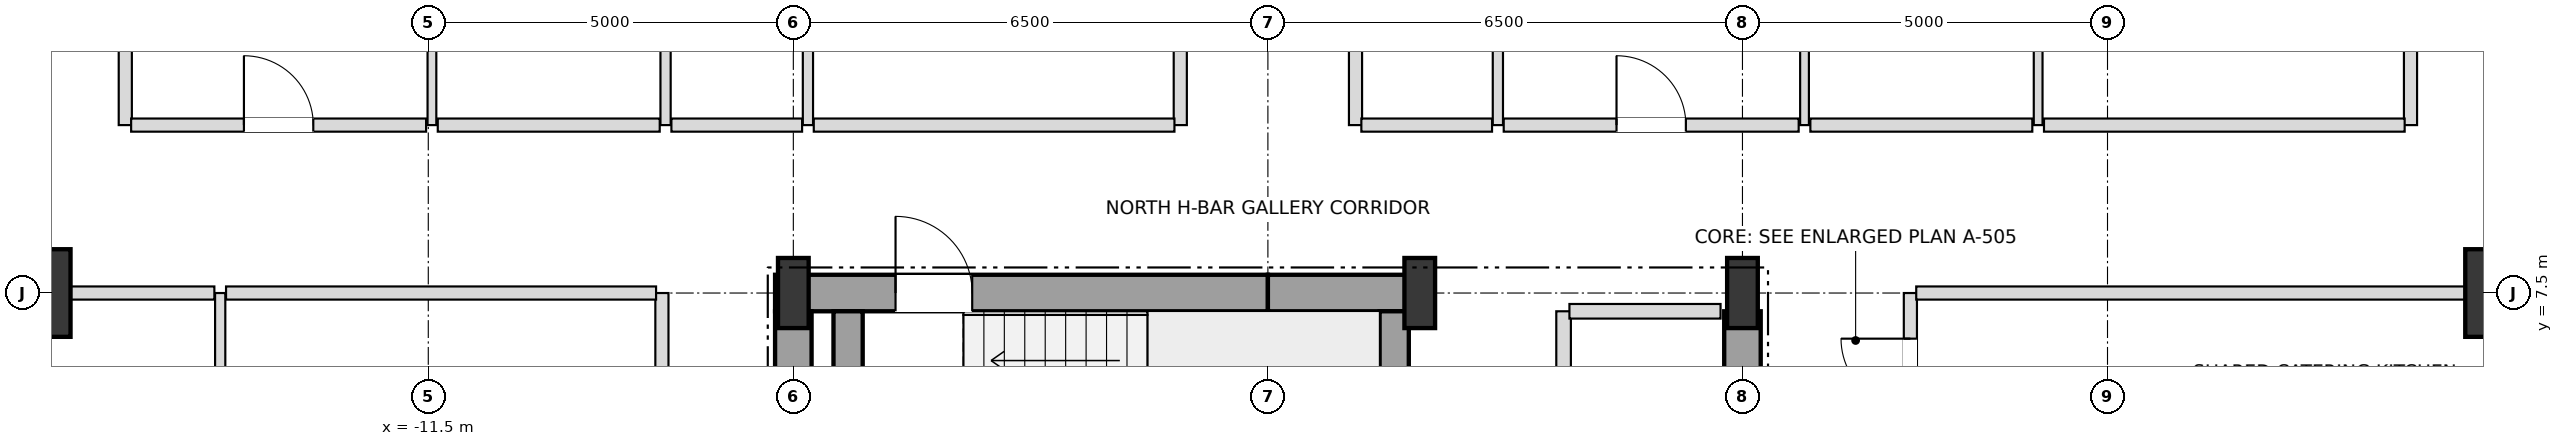
"""IFC4 building model, lengths in metres.
Left out: names, types, materials, properties, quantities, classifications, styles, units other than length and angle.
Written with IfcOpenShell. Run it as: python <this file> out.ifc"""

import sys

from ifc_helpers import new_model, si_unit, direction, frame, frame_2d, origin, origin_2d, place, context, subcontext, project, spatial, rectangle, i_section, extrude, element, fill, save


model = new_model("IFC4")
c1 = context("Model", 3, precision=1e-05, world=origin(), true_north=direction((0.0, 1.0)))
c2 = subcontext(c1, "Body", "Model", "MODEL_VIEW")
j1 = project(units=[si_unit("LENGTHUNIT", "METRE"), si_unit("PLANEANGLEUNIT", "RADIAN")], contexts=[c1])
p1 = place(None, origin())
s1 = spatial("IfcSite", under=j1, at=p1, CompositionType="ELEMENT")
p2 = place(p1, origin())
s2 = spatial("IfcBuilding", under=s1, at=p2, CompositionType="ELEMENT")
p3 = place(p2, frame((0.0, 0.0, 140.4)))
s3 = spatial("IfcBuildingStorey", under=s2, at=p3, CompositionType="ELEMENT", Elevation=140.4)
for number, where, z_axis, x_axis in (
    (1, (-6.5, 7.5, 0.0), (0.0, 0.0, 1.0), (1.0, 0.0, 0.0)),
    (2, (2.08, 7.5, 0.0), (0.0, 0.0, 1.0), (1.0, 0.0, 0.0)),
    (3, (6.5, 7.5, 0.0), (0.0, 0.0, 1.0), (1.0, 0.0, 0.0)),
):
    element("IfcColumn", number, at=place(p3, frame(where, z_axis=z_axis, x_axis=x_axis)), inside=s3, PredefinedType="COLUMN", context=c2, shape_type="SweptSolid", body=[
        extrude(i_section(OverallWidth=0.42, OverallDepth=0.96, WebThickness=0.022, FlangeThickness=0.034, at=origin_2d()), origin(), (0.0, 0.0, 1.0), 3.6),
    ])
for number, where, z_axis, x_axis in (
    (4, (17.0, 7.5, 0.0), (0.0, 0.0, 1.0), (1.0, 0.0, 0.0)),
    (5, (-17.0, 7.5, 0.0), (0.0, 0.0, 1.0), (1.0, 0.0, 0.0)),
):
    element("IfcColumn", number, at=place(p3, frame(where, z_axis=z_axis, x_axis=x_axis)), inside=s3, PredefinedType="USERDEFINED", context=c2, shape_type="SweptSolid", body=[
        extrude(rectangle(XDim=1.2, YDim=1.2, at=origin_2d()), origin(), (0.0, 0.0, 1.0), 3.6),
    ])
p4 = place(p3, frame((-6.75, 7.5, 0.0), z_axis=(0.0, 0.0, 1.0), x_axis=(1.0, 0.0, 0.0)))
e6 = element("IfcWall", 6, at=p4, inside=s3, PredefinedType="SHEAR", context=c2, shape_type="SweptSolid", body=[
    extrude(rectangle(XDim=6.75, YDim=0.5, at=frame_2d((3.375, 0.0))), origin(), (0.0, 0.0, 1.0), 3.38),
])
p5 = place(p4, frame((1.65, 0.0, 0.0)))
e7 = element("IfcOpeningElement", 7, at=p5, cuts=e6, PredefinedType="OPENING", context=c2, shape_type="SweptSolid", body=[
    extrude(rectangle(XDim=1.05, YDim=2.15, at=frame_2d((0.525, 1.075))), frame((0.0, 0.26, 0.0), z_axis=(0.0, -1.0, 0.0), x_axis=(1.0, 0.0, 0.0)), (0.0, 0.0, 1.0), 0.52),
])
p6 = place(p3, frame((0.0, 7.5, 0.0), z_axis=(0.0, 0.0, 1.0), x_axis=(1.0, 0.0, 0.0)))
e8 = element("IfcWall", 8, at=p6, inside=s3, PredefinedType="SHEAR", context=c2, shape_type="SweptSolid", body=[
    extrude(rectangle(XDim=2.08, YDim=0.5, at=frame_2d((1.04, 0.0))), origin(), (0.0, 0.0, 1.0), 3.38),
])
for number, where, z_axis, x_axis in (
    (9, (-6.5, 3.95, 0.0), (0.0, 0.0, 1.0), (0.0, 1.0, 0.0)),
    (10, (6.5, 3.95, 0.0), (0.0, 0.0, 1.0), (0.0, 1.0, 0.0)),
):
    element("IfcWall", number, at=place(p3, frame(where, z_axis=z_axis, x_axis=x_axis)), inside=s3, PredefinedType="SHEAR", context=c2, shape_type="SweptSolid", body=[
        extrude(rectangle(XDim=3.3, YDim=0.5, at=frame_2d((1.65, 0.0))), origin(), (0.0, 0.0, 1.0), 3.38),
    ])
for number, where, z_axis, x_axis in (
    (11, (1.73, 3.95, 0.0), (0.0, 0.0, 1.0), (0.0, 1.0, 0.0)),
    (12, (-5.75, 3.95, 0.0), (0.0, 0.0, 1.0), (0.0, 1.0, 0.0)),
):
    element("IfcWall", number, at=place(p3, frame(where, z_axis=z_axis, x_axis=x_axis)), inside=s3, PredefinedType="SHEAR", context=c2, shape_type="SweptSolid", body=[
        extrude(rectangle(XDim=3.3, YDim=0.4, at=frame_2d((1.65, 0.0))), origin(), (0.0, 0.0, 1.0), 3.38),
    ])
p7 = place(p3, frame((-15.65, 9.8, 0.0), z_axis=(0.0, 0.0, 1.0), x_axis=(0.0, 1.0, 0.0)))
e13 = element("IfcWall", 13, at=p7, inside=s3, PredefinedType="PARTITIONING", context=c2, shape_type="SweptSolid", body=[
    extrude(rectangle(XDim=7.35, YDim=0.18, at=frame_2d((3.675, 0.0))), origin(), (0.0, 0.0, 1.0), 2.736),
])
p8 = place(p3, frame((-14.35, -7.5, 0.0), z_axis=(0.0, 0.0, 1.0), x_axis=(0.0, 1.0, 0.0)))
e14 = element("IfcWall", 14, at=p8, inside=s3, PredefinedType="PARTITIONING", context=c2, shape_type="SweptSolid", body=[
    extrude(rectangle(XDim=15.0, YDim=0.14, at=frame_2d((7.5, 0.0))), origin(), (0.0, 0.0, 1.0), 3.38),
])
p9 = place(p8, frame((3.475, 0.0, 0.0)))
e15 = element("IfcOpeningElement", 15, at=p9, cuts=e14, PredefinedType="OPENING", context=c2, shape_type="SweptSolid", body=[
    extrude(rectangle(XDim=0.95, YDim=2.1, at=frame_2d((0.475, 1.05))), frame((0.0, 0.08, 0.0), z_axis=(0.0, -1.0, 0.0), x_axis=(1.0, 0.0, 0.0)), (0.0, 0.0, 1.0), 0.16),
])
p10 = place(p3, frame((-11.45, 9.8, 0.0), z_axis=(0.0, 0.0, 1.0), x_axis=(0.0, 1.0, 0.0)))
e16 = element("IfcWall", 16, at=p10, inside=s3, PredefinedType="PARTITIONING", context=c2, shape_type="SweptSolid", body=[
    extrude(rectangle(XDim=7.35, YDim=0.12, at=frame_2d((3.675, 0.0))), origin(), (0.0, 0.0, 1.0), 2.736),
])
p11 = place(p10, frame((3.713, 0.0, 0.0)))
e17 = element("IfcOpeningElement", 17, at=p11, cuts=e16, PredefinedType="OPENING", context=c2, shape_type="SweptSolid", body=[
    extrude(rectangle(XDim=0.95, YDim=2.1, at=frame_2d((0.475, 1.05))), frame((0.0, 0.07, 0.0), z_axis=(0.0, -1.0, 0.0), x_axis=(1.0, 0.0, 0.0)), (0.0, 0.0, 1.0), 0.14),
])
p12 = place(p3, frame((-8.3, -7.5, 0.0), z_axis=(0.0, 0.0, 1.0), x_axis=(0.0, 1.0, 0.0)))
e18 = element("IfcWall", 18, at=p12, inside=s3, PredefinedType="PARTITIONING", context=c2, shape_type="SweptSolid", body=[
    extrude(rectangle(XDim=15.0, YDim=0.18, at=frame_2d((7.5, 0.0))), origin(), (0.0, 0.0, 1.0), 3.38),
])
p13 = place(p12, frame((2.495, 0.0, 0.0)))
e19 = element("IfcOpeningElement", 19, at=p13, cuts=e18, PredefinedType="OPENING", context=c2, shape_type="SweptSolid", body=[
    extrude(rectangle(XDim=0.95, YDim=2.15, at=frame_2d((0.475, 1.075))), frame((0.0, 0.1, 0.0), z_axis=(0.0, -1.0, 0.0), x_axis=(1.0, 0.0, 0.0)), (0.0, 0.0, 1.0), 0.2),
])
p14 = place(p3, frame((-8.25, 9.8, 0.0), z_axis=(0.0, 0.0, 1.0), x_axis=(0.0, 1.0, 0.0)))
e20 = element("IfcWall", 20, at=p14, inside=s3, PredefinedType="PARTITIONING", context=c2, shape_type="SweptSolid", body=[
    extrude(rectangle(XDim=7.35, YDim=0.14, at=frame_2d((3.675, 0.0))), origin(), (0.0, 0.0, 1.0), 2.816),
])
p15 = place(p14, frame((3.22, 0.0, 0.0)))
e21 = element("IfcOpeningElement", 21, at=p15, cuts=e20, PredefinedType="OPENING", context=c2, shape_type="SweptSolid", body=[
    extrude(rectangle(XDim=0.9, YDim=2.1, at=frame_2d((0.45, 1.05))), frame((0.0, 0.08, 0.0), z_axis=(0.0, -1.0, 0.0), x_axis=(1.0, 0.0, 0.0)), (0.0, 0.0, 1.0), 0.16),
])
p16 = place(p3, frame((-6.3, 9.8, 0.0), z_axis=(0.0, 0.0, 1.0), x_axis=(0.0, 1.0, 0.0)))
e22 = element("IfcWall", 22, at=p16, inside=s3, PredefinedType="PARTITIONING", context=c2, shape_type="SweptSolid", body=[
    extrude(rectangle(XDim=13.35, YDim=0.14, at=frame_2d((6.675, 0.0))), origin(), (0.0, 0.0, 1.0), 2.816),
])
p17 = place(p16, frame((11.051, 0.0, 0.0)))
e23 = element("IfcOpeningElement", 23, at=p17, cuts=e22, PredefinedType="OPENING", context=c2, shape_type="SweptSolid", body=[
    extrude(rectangle(XDim=0.9, YDim=2.1, at=frame_2d((0.45, 1.05))), frame((0.0, 0.08, 0.0), z_axis=(0.0, -1.0, 0.0), x_axis=(1.0, 0.0, 0.0)), (0.0, 0.0, 1.0), 0.16),
])
for number, where, z_axis, x_axis in (
    (24, (-1.2, 9.8, 0.0), (0.0, 0.0, 1.0), (0.0, 1.0, 0.0)),
    (25, (1.2, 9.8, 0.0), (0.0, 0.0, 1.0), (0.0, 1.0, 0.0)),
):
    element("IfcWall", number, at=place(p3, frame(where, z_axis=z_axis, x_axis=x_axis)), inside=s3, PredefinedType="PARTITIONING", context=c2, shape_type="SweptSolid", body=[
        extrude(rectangle(XDim=13.35, YDim=0.18, at=frame_2d((6.675, 0.0))), origin(), (0.0, 0.0, 1.0), 2.816),
    ])
p18 = place(p3, frame((3.15, 9.8, 0.0), z_axis=(0.0, 0.0, 1.0), x_axis=(0.0, 1.0, 0.0)))
e26 = element("IfcWall", 26, at=p18, inside=s3, PredefinedType="PARTITIONING", context=c2, shape_type="SweptSolid", body=[
    extrude(rectangle(XDim=7.35, YDim=0.14, at=frame_2d((3.675, 0.0))), origin(), (0.0, 0.0, 1.0), 3.38),
])
p19 = place(p18, frame((3.22, 0.0, 0.0)))
e27 = element("IfcOpeningElement", 27, at=p19, cuts=e26, PredefinedType="OPENING", context=c2, shape_type="SweptSolid", body=[
    extrude(rectangle(XDim=0.9, YDim=2.1, at=frame_2d((0.45, 1.05))), frame((0.0, 0.08, 0.0), z_axis=(0.0, -1.0, 0.0), x_axis=(1.0, 0.0, 0.0)), (0.0, 0.0, 1.0), 0.16),
])
p20 = place(p3, frame((4.05, 4.2, 0.0), z_axis=(0.0, 0.0, 1.0), x_axis=(0.0, 1.0, 0.0)))
e28 = element("IfcWall", 28, at=p20, inside=s3, PredefinedType="SOLIDWALL", context=c2, shape_type="SweptSolid", body=[
    extrude(rectangle(XDim=3.05, YDim=0.2, at=frame_2d((1.525, 0.0))), origin(), (0.0, 0.0, 1.0), 3.38),
])
p21 = place(p20, frame((0.975, 0.0, 0.0)))
e29 = element("IfcOpeningElement", 29, at=p21, cuts=e28, PredefinedType="OPENING", context=c2, shape_type="SweptSolid", body=[
    extrude(rectangle(XDim=0.95, YDim=2.15, at=frame_2d((0.475, 1.075))), frame((0.0, 0.11, 0.0), z_axis=(0.0, -1.0, 0.0), x_axis=(1.0, 0.0, 0.0)), (0.0, 0.0, 1.0), 0.22),
])
p22 = place(p3, frame((7.35, 9.8, 0.0), z_axis=(0.0, 0.0, 1.0), x_axis=(0.0, 1.0, 0.0)))
e30 = element("IfcWall", 30, at=p22, inside=s3, PredefinedType="PARTITIONING", context=c2, shape_type="SweptSolid", body=[
    extrude(rectangle(XDim=13.35, YDim=0.12, at=frame_2d((6.675, 0.0))), origin(), (0.0, 0.0, 1.0), 2.816),
])
p23 = place(p22, frame((3.195, 0.0, 0.0)))
e31 = element("IfcOpeningElement", 31, at=p23, cuts=e30, PredefinedType="OPENING", context=c2, shape_type="SweptSolid", body=[
    extrude(rectangle(XDim=0.95, YDim=2.1, at=frame_2d((0.475, 1.05))), frame((0.0, 0.07, 0.0), z_axis=(0.0, -1.0, 0.0), x_axis=(1.0, 0.0, 0.0)), (0.0, 0.0, 1.0), 0.14),
])
p24 = place(p22, frame((11.051, 0.0, 0.0)))
e32 = element("IfcOpeningElement", 32, at=p24, cuts=e30, PredefinedType="OPENING", context=c2, shape_type="SweptSolid", body=[
    extrude(rectangle(XDim=0.9, YDim=2.1, at=frame_2d((0.45, 1.05))), frame((0.0, 0.07, 0.0), z_axis=(0.0, -1.0, 0.0), x_axis=(1.0, 0.0, 0.0)), (0.0, 0.0, 1.0), 0.14),
])
p25 = place(p3, frame((8.8, -7.5, 0.0), z_axis=(0.0, 0.0, 1.0), x_axis=(0.0, 1.0, 0.0)))
e33 = element("IfcWall", 33, at=p25, inside=s3, PredefinedType="PARTITIONING", context=c2, shape_type="SweptSolid", body=[
    extrude(rectangle(XDim=15.0, YDim=0.18, at=frame_2d((7.5, 0.0))), origin(), (0.0, 0.0, 1.0), 3.38),
])
p26 = place(p25, frame((2.075, 0.0, 0.0)))
e34 = element("IfcOpeningElement", 34, at=p26, cuts=e33, PredefinedType="OPENING", context=c2, shape_type="SweptSolid", body=[
    extrude(rectangle(XDim=0.95, YDim=2.15, at=frame_2d((0.475, 1.075))), frame((0.0, 0.1, 0.0), z_axis=(0.0, -1.0, 0.0), x_axis=(1.0, 0.0, 0.0)), (0.0, 0.0, 1.0), 0.2),
])
p27 = place(p25, frame((8.475, 0.0, 0.0)))
e35 = element("IfcOpeningElement", 35, at=p27, cuts=e33, PredefinedType="OPENING", context=c2, shape_type="SweptSolid", body=[
    extrude(rectangle(XDim=0.95, YDim=2.15, at=frame_2d((0.475, 1.075))), frame((0.0, 0.1, 0.0), z_axis=(0.0, -1.0, 0.0), x_axis=(1.0, 0.0, 0.0)), (0.0, 0.0, 1.0), 0.2),
])
p28 = place(p25, frame((13.425, 0.0, 0.0)))
e36 = element("IfcOpeningElement", 36, at=p28, cuts=e33, PredefinedType="OPENING", context=c2, shape_type="SweptSolid", body=[
    extrude(rectangle(XDim=0.95, YDim=2.15, at=frame_2d((0.475, 1.075))), frame((0.0, 0.1, 0.0), z_axis=(0.0, -1.0, 0.0), x_axis=(1.0, 0.0, 0.0)), (0.0, 0.0, 1.0), 0.2),
])
p29 = place(p3, frame((10.55, 9.8, 0.0), z_axis=(0.0, 0.0, 1.0), x_axis=(0.0, 1.0, 0.0)))
e37 = element("IfcWall", 37, at=p29, inside=s3, PredefinedType="PARTITIONING", context=c2, shape_type="SweptSolid", body=[
    extrude(rectangle(XDim=13.35, YDim=0.12, at=frame_2d((6.675, 0.0))), origin(), (0.0, 0.0, 1.0), 2.816),
])
p30 = place(p29, frame((3.713, 0.0, 0.0)))
e38 = element("IfcOpeningElement", 38, at=p30, cuts=e37, PredefinedType="OPENING", context=c2, shape_type="SweptSolid", body=[
    extrude(rectangle(XDim=0.95, YDim=2.1, at=frame_2d((0.475, 1.05))), frame((0.0, 0.07, 0.0), z_axis=(0.0, -1.0, 0.0), x_axis=(1.0, 0.0, 0.0)), (0.0, 0.0, 1.0), 0.14),
])
p31 = place(p29, frame((11.051, 0.0, 0.0)))
e39 = element("IfcOpeningElement", 39, at=p31, cuts=e37, PredefinedType="OPENING", context=c2, shape_type="SweptSolid", body=[
    extrude(rectangle(XDim=0.9, YDim=2.1, at=frame_2d((0.45, 1.05))), frame((0.0, 0.07, 0.0), z_axis=(0.0, -1.0, 0.0), x_axis=(1.0, 0.0, 0.0)), (0.0, 0.0, 1.0), 0.14),
])
p32 = place(p3, frame((15.65, 9.8, 0.0), z_axis=(0.0, 0.0, 1.0), x_axis=(0.0, 1.0, 0.0)))
e40 = element("IfcWall", 40, at=p32, inside=s3, PredefinedType="PARTITIONING", context=c2, shape_type="SweptSolid", body=[
    extrude(rectangle(XDim=7.35, YDim=0.18, at=frame_2d((3.675, 0.0))), origin(), (0.0, 0.0, 1.0), 2.736),
])
p33 = place(p3, frame((4.13, 7.25, 0.0), z_axis=(0.0, 0.0, 1.0), x_axis=(1.0, 0.0, 0.0)))
e41 = element("IfcWall", 41, at=p33, inside=s3, PredefinedType="SOLIDWALL", context=c2, shape_type="SweptSolid", body=[
    extrude(rectangle(XDim=2.07, YDim=0.2, at=frame_2d((1.035, 0.0))), origin(), (0.0, 0.0, 1.0), 3.38),
])
p34 = place(p3, frame((-20.15, 7.5, 0.0), z_axis=(0.0, 0.0, 1.0), x_axis=(1.0, 0.0, 0.0)))
e42 = element("IfcWall", 42, at=p34, inside=s3, PredefinedType="PARTITIONING", context=c2, shape_type="SweptSolid", body=[
    extrude(rectangle(XDim=5.72, YDim=0.18, at=frame_2d((2.86, 0.0))), origin(), (0.0, 0.0, 1.0), 2.816),
])
p35 = place(p3, frame((-14.27, 7.5, 0.0), z_axis=(0.0, 0.0, 1.0), x_axis=(1.0, 0.0, 0.0)))
e43 = element("IfcWall", 43, at=p35, inside=s3, PredefinedType="PARTITIONING", context=c2, shape_type="SweptSolid", body=[
    extrude(rectangle(XDim=5.89, YDim=0.18, at=frame_2d((2.945, 0.0))), origin(), (0.0, 0.0, 1.0), 2.816),
])
p36 = place(p3, frame((8.88, 7.5, 0.0), z_axis=(0.0, 0.0, 1.0), x_axis=(1.0, 0.0, 0.0)))
e44 = element("IfcWall", 44, at=p36, inside=s3, PredefinedType="PARTITIONING", context=c2, shape_type="SweptSolid", body=[
    extrude(rectangle(XDim=11.27, YDim=0.18, at=frame_2d((5.635, 0.0))), origin(), (0.0, 0.0, 1.0), 2.816),
])
p37 = place(p3, frame((-15.57, 9.8, 0.0), z_axis=(0.0, 0.0, 1.0), x_axis=(1.0, 0.0, 0.0)))
e45 = element("IfcWall", 45, at=p37, inside=s3, PredefinedType="PARTITIONING", context=c2, shape_type="SweptSolid", body=[
    extrude(rectangle(XDim=4.04, YDim=0.18, at=frame_2d((2.02, 0.0))), origin(), (0.0, 0.0, 1.0), 3.38),
])
p38 = place(p37, frame((1.545, 0.0, 0.0)))
e46 = element("IfcOpeningElement", 46, at=p38, cuts=e45, PredefinedType="OPENING", context=c2, shape_type="SweptSolid", body=[
    extrude(rectangle(XDim=0.95, YDim=2.15, at=frame_2d((0.475, 1.075))), frame((0.0, 0.1, 0.0), z_axis=(0.0, -1.0, 0.0), x_axis=(1.0, 0.0, 0.0)), (0.0, 0.0, 1.0), 0.2),
])
p39 = place(p3, frame((-11.37, 9.8, 0.0), z_axis=(0.0, 0.0, 1.0), x_axis=(1.0, 0.0, 0.0)))
e47 = element("IfcWall", 47, at=p39, inside=s3, PredefinedType="PARTITIONING", context=c2, shape_type="SweptSolid", body=[
    extrude(rectangle(XDim=3.04, YDim=0.18, at=frame_2d((1.52, 0.0))), origin(), (0.0, 0.0, 1.0), 3.38),
])
p40 = place(p3, frame((-8.17, 9.8, 0.0), z_axis=(0.0, 0.0, 1.0), x_axis=(1.0, 0.0, 0.0)))
e48 = element("IfcWall", 48, at=p40, inside=s3, PredefinedType="PARTITIONING", context=c2, shape_type="SweptSolid", body=[
    extrude(rectangle(XDim=1.79, YDim=0.18, at=frame_2d((0.895, 0.0))), origin(), (0.0, 0.0, 1.0), 2.816),
])
p41 = place(p3, frame((-6.22, 9.8, 0.0), z_axis=(0.0, 0.0, 1.0), x_axis=(1.0, 0.0, 0.0)))
e49 = element("IfcWall", 49, at=p41, inside=s3, PredefinedType="PARTITIONING", context=c2, shape_type="SweptSolid", body=[
    extrude(rectangle(XDim=4.94, YDim=0.18, at=frame_2d((2.47, 0.0))), origin(), (0.0, 0.0, 1.0), 3.38),
])
p42 = place(p3, frame((1.28, 9.8, 0.0), z_axis=(0.0, 0.0, 1.0), x_axis=(1.0, 0.0, 0.0)))
e50 = element("IfcWall", 50, at=p42, inside=s3, PredefinedType="PARTITIONING", context=c2, shape_type="SweptSolid", body=[
    extrude(rectangle(XDim=1.79, YDim=0.18, at=frame_2d((0.895, 0.0))), origin(), (0.0, 0.0, 1.0), 3.38),
])
p43 = place(p3, frame((3.23, 9.8, 0.0), z_axis=(0.0, 0.0, 1.0), x_axis=(1.0, 0.0, 0.0)))
e51 = element("IfcWall", 51, at=p43, inside=s3, PredefinedType="PARTITIONING", context=c2, shape_type="SweptSolid", body=[
    extrude(rectangle(XDim=4.04, YDim=0.18, at=frame_2d((2.02, 0.0))), origin(), (0.0, 0.0, 1.0), 2.816),
])
p44 = place(p43, frame((1.545, 0.0, 0.0)))
e52 = element("IfcOpeningElement", 52, at=p44, cuts=e51, PredefinedType="OPENING", context=c2, shape_type="SweptSolid", body=[
    extrude(rectangle(XDim=0.95, YDim=2.15, at=frame_2d((0.475, 1.075))), frame((0.0, 0.1, 0.0), z_axis=(0.0, -1.0, 0.0), x_axis=(1.0, 0.0, 0.0)), (0.0, 0.0, 1.0), 0.2),
])
p45 = place(p3, frame((7.43, 9.8, 0.0), z_axis=(0.0, 0.0, 1.0), x_axis=(1.0, 0.0, 0.0)))
e53 = element("IfcWall", 53, at=p45, inside=s3, PredefinedType="PARTITIONING", context=c2, shape_type="SweptSolid", body=[
    extrude(rectangle(XDim=3.04, YDim=0.18, at=frame_2d((1.52, 0.0))), origin(), (0.0, 0.0, 1.0), 3.38),
])
p46 = place(p3, frame((10.63, 9.8, 0.0), z_axis=(0.0, 0.0, 1.0), x_axis=(1.0, 0.0, 0.0)))
e54 = element("IfcWall", 54, at=p46, inside=s3, PredefinedType="PARTITIONING", context=c2, shape_type="SweptSolid", body=[
    extrude(rectangle(XDim=4.94, YDim=0.18, at=frame_2d((2.47, 0.0))), origin(), (0.0, 0.0, 1.0), 3.38),
])
p47 = place(p5, origin())
e55 = element("IfcDoor", 55, at=p47, inside=s3, OperationType="SINGLE_SWING_LEFT", PredefinedType="DOOR", context=c2, shape_type="SweptSolid", body=[
    extrude(rectangle(XDim=1.05, YDim=2.15, at=frame_2d((0.525, 1.075))), frame((0.0, 0.025, 0.0), z_axis=(0.0, -1.0, 0.0), x_axis=(1.0, 0.0, 0.0)), (0.0, 0.0, 1.0), 0.05),
])
fill(e7, e55)
p48 = place(p38, origin())
e56 = element("IfcDoor", 56, at=p48, inside=s3, OperationType="SINGLE_SWING_LEFT", PredefinedType="DOOR", context=c2, shape_type="SweptSolid", body=[
    extrude(rectangle(XDim=0.95, YDim=2.15, at=frame_2d((0.475, 1.075))), frame((0.0, 0.025, 0.0), z_axis=(0.0, -1.0, 0.0), x_axis=(1.0, 0.0, 0.0)), (0.0, 0.0, 1.0), 0.05),
])
fill(e46, e56)
p49 = place(p44, origin())
e57 = element("IfcDoor", 57, at=p49, inside=s3, OperationType="SINGLE_SWING_LEFT", PredefinedType="DOOR", context=c2, shape_type="SweptSolid", body=[
    extrude(rectangle(XDim=0.95, YDim=2.15, at=frame_2d((0.475, 1.075))), frame((0.0, 0.025, 0.0), z_axis=(0.0, -1.0, 0.0), x_axis=(1.0, 0.0, 0.0)), (0.0, 0.0, 1.0), 0.05),
])
fill(e52, e57)
p50 = place(p28, origin())
e58 = element("IfcDoor", 58, at=p50, inside=s3, OperationType="SINGLE_SWING_RIGHT", PredefinedType="DOOR", context=c2, shape_type="SweptSolid", body=[
    extrude(rectangle(XDim=0.95, YDim=2.15, at=frame_2d((0.475, 1.075))), frame((0.0, 0.025, 0.0), z_axis=(0.0, -1.0, 0.0), x_axis=(1.0, 0.0, 0.0)), (0.0, 0.0, 1.0), 0.05),
])
fill(e36, e58)
save(model, sys.argv[1])
